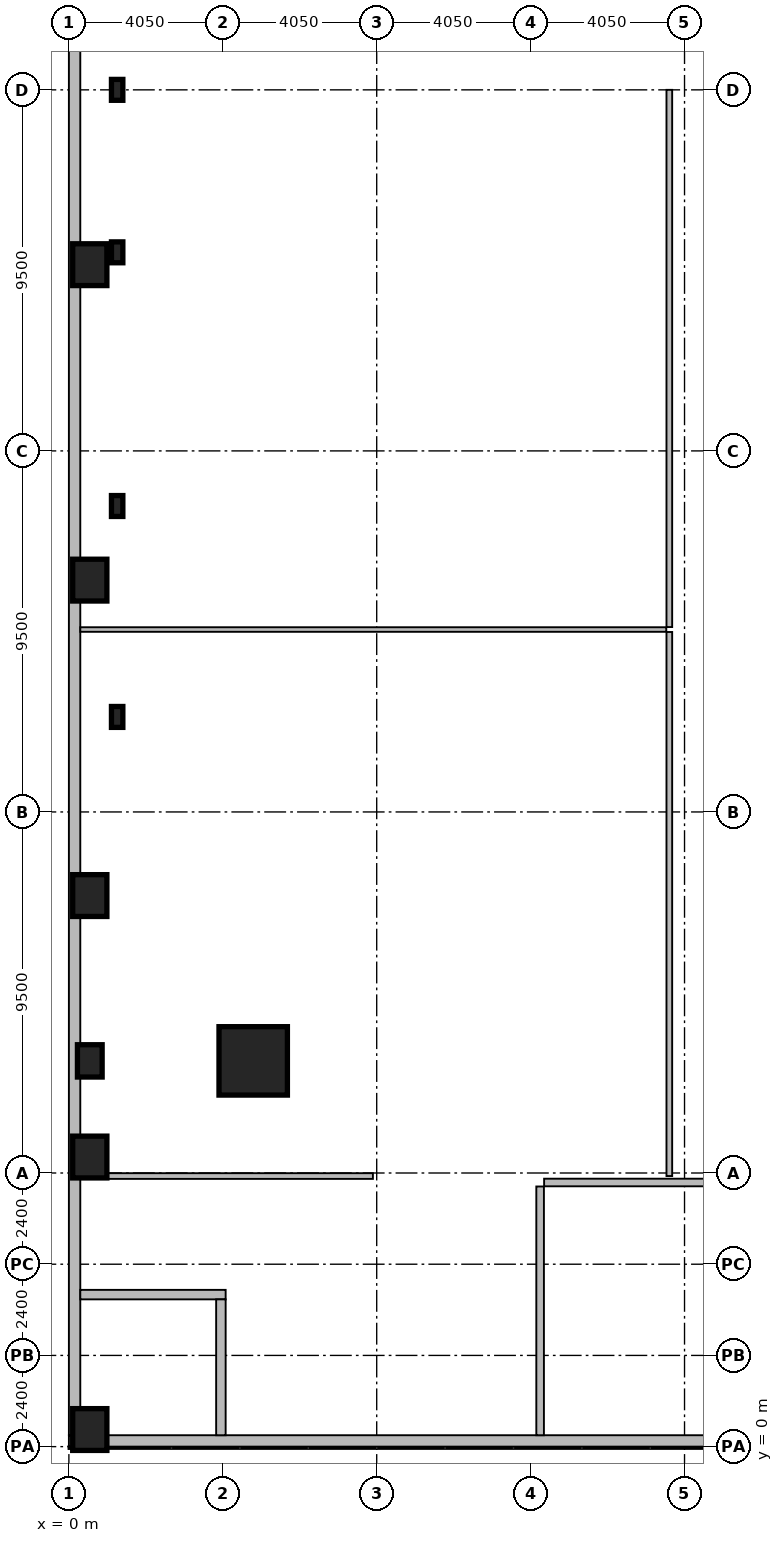
"""IFC4 building model, lengths in metres.
Left out: names, types, materials, properties, quantities, classifications, styles, units other than length and angle.
Written with IfcOpenShell. Run it as: python <this file> out.ifc"""

import sys

from ifc_helpers import new_model, si_unit, direction, frame, frame_2d, origin, origin_2d, place, context, subcontext, project, spatial, rectangle, hollow_rectangle, i_section, extrude, element, fill, save


model = new_model("IFC4")
c1 = context("Model", 3, precision=1e-05, world=origin(), true_north=direction((0.0, 1.0)))
c2 = subcontext(c1, "Body", "Model", "MODEL_VIEW")
j1 = project(units=[si_unit("LENGTHUNIT", "METRE"), si_unit("PLANEANGLEUNIT", "RADIAN")], contexts=[c1])
p1 = place(None, origin())
s1 = spatial("IfcSite", under=j1, at=p1, CompositionType="ELEMENT")
p2 = place(p1, origin())
s2 = spatial("IfcBuilding", under=s1, at=p2, CompositionType="ELEMENT")
p3 = place(p2, origin())
s3 = spatial("IfcBuildingStorey", under=s2, at=p3, CompositionType="ELEMENT", Elevation=0.0)
p4 = place(p3, frame((4.85, 10.15, 0.0), z_axis=(0.0, 0.0, 1.0), x_axis=(1.0, 0.0, 0.0)))
e1 = element("IfcColumn", 1, at=p4, inside=s3, PredefinedType="COLUMN", context=c2, shape_type="SweptSolid", body=[
    extrude(hollow_rectangle(XDim=1.8, YDim=1.8, WallThickness=0.08, at=origin_2d()), origin(), (0.0, 0.0, 1.0), 5.4),
])
for number, where, z_axis, x_axis in (
    (2, (1.27, 19.2, 0.0), (0.0, 0.0, 1.0), (1.0, 0.0, 0.0)),
    (3, (1.27, 24.75, 0.0), (0.0, 0.0, 1.0), (1.0, 0.0, 0.0)),
    (4, (1.27, 31.425, 0.0), (0.0, 0.0, 1.0), (1.0, 0.0, 0.0)),
    (5, (1.27, 35.7, 0.0), (0.0, 0.0, 1.0), (1.0, 0.0, 0.0)),
):
    element("IfcColumn", number, at=place(p3, frame(where, z_axis=z_axis, x_axis=x_axis)), inside=s3, PredefinedType="COLUMN", context=c2, shape_type="SweptSolid", body=[
        extrude(i_section(OverallWidth=0.3, OverallDepth=0.55, WebThickness=0.015, FlangeThickness=0.029, at=origin_2d()), origin(), (0.0, 0.0, 1.0), 5.4),
    ])
p5 = place(p3, frame((0.55, 7.62, 0.0), z_axis=(0.0, 0.0, 1.0), x_axis=(1.0, 0.0, 0.0)))
e6 = element("IfcColumn", 6, at=p5, inside=s3, PredefinedType="PILASTER", context=c2, shape_type="SweptSolid", body=[
    extrude(rectangle(XDim=0.9, YDim=1.1, at=origin_2d()), origin(), (0.0, 0.0, 1.0), 5.4),
])
p6 = place(p3, frame((0.55, 10.15, 0.0), z_axis=(0.0, 0.0, 1.0), x_axis=(1.0, 0.0, 0.0)))
e7 = element("IfcColumn", 7, at=p6, inside=s3, PredefinedType="PILASTER", context=c2, shape_type="SweptSolid", body=[
    extrude(rectangle(XDim=0.65, YDim=0.85, at=origin_2d()), origin(), (0.0, 0.0, 1.0), 5.4),
])
for number, where, z_axis, x_axis in (
    (8, (0.55, 14.5, 0.0), (0.0, 0.0, 1.0), (1.0, 0.0, 0.0)),
    (9, (0.55, 22.8, 0.0), (0.0, 0.0, 1.0), (1.0, 0.0, 0.0)),
    (10, (0.55, 31.1, 0.0), (0.0, 0.0, 1.0), (1.0, 0.0, 0.0)),
    (11, (0.55, 0.45, 0.0), (0.0, 0.0, 1.0), (1.0, 0.0, 0.0)),
):
    element("IfcColumn", number, at=place(p3, frame(where, z_axis=z_axis, x_axis=x_axis)), inside=s3, PredefinedType="PILASTER", context=c2, shape_type="SweptSolid", body=[
        extrude(rectangle(XDim=0.9, YDim=1.1, at=origin_2d()), origin(), (0.0, 0.0, 1.0), 5.4),
    ])
p7 = place(p3, frame((72.9, 0.15, 0.0), z_axis=(0.0, 0.0, 1.0), x_axis=(-1.0, 0.0, 0.0)))
e12 = element("IfcWall", 12, at=p7, inside=s3, PredefinedType="SOLIDWALL", context=c2, shape_type="SweptSolid", body=[
    extrude(rectangle(XDim=72.9, YDim=0.3, at=frame_2d((36.45, 0.0))), origin(), (0.0, 0.0, 1.0), 4.54),
])
p8 = place(p7, frame((6.5, 0.0, 0.0)))
e13 = element("IfcOpeningElement", 13, at=p8, cuts=e12, PredefinedType="OPENING", context=c2, shape_type="SweptSolid", body=[
    extrude(rectangle(XDim=2.0, YDim=2.5, at=frame_2d((1.0, 1.25))), frame((0.0, 0.16, 0.0), z_axis=(0.0, -1.0, 0.0), x_axis=(1.0, 0.0, 0.0)), (0.0, 0.0, 1.0), 0.32),
])
p9 = place(p7, frame((11.5, 0.0, 0.0)))
e14 = element("IfcOpeningElement", 14, at=p9, cuts=e12, PredefinedType="OPENING", context=c2, shape_type="SweptSolid", body=[
    extrude(rectangle(XDim=2.0, YDim=2.5, at=frame_2d((1.0, 1.25))), frame((0.0, 0.16, 0.0), z_axis=(0.0, -1.0, 0.0), x_axis=(1.0, 0.0, 0.0)), (0.0, 0.0, 1.0), 0.32),
])
p10 = place(p7, frame((62.7, 0.0, 0.0)))
e15 = element("IfcOpeningElement", 15, at=p10, cuts=e12, PredefinedType="OPENING", context=c2, shape_type="SweptSolid", body=[
    extrude(rectangle(XDim=2.0, YDim=2.5, at=frame_2d((1.0, 1.25))), frame((0.0, 0.16, 0.0), z_axis=(0.0, -1.0, 0.0), x_axis=(1.0, 0.0, 0.0)), (0.0, 0.0, 1.0), 0.32),
])
p11 = place(p7, frame((67.1, 0.0, 0.0)))
e16 = element("IfcOpeningElement", 16, at=p11, cuts=e12, PredefinedType="OPENING", context=c2, shape_type="SweptSolid", body=[
    extrude(rectangle(XDim=1.05, YDim=2.15, at=frame_2d((0.525, 1.075))), frame((0.0, 0.16, 0.0), z_axis=(0.0, -1.0, 0.0), x_axis=(1.0, 0.0, 0.0)), (0.0, 0.0, 1.0), 0.32),
])
p12 = place(p7, frame((2.9, 0.0, 0.0)))
e17 = element("IfcOpeningElement", 17, at=p12, cuts=e12, PredefinedType="OPENING", context=c2, shape_type="SweptSolid", body=[
    extrude(rectangle(XDim=1.05, YDim=2.15, at=frame_2d((0.525, 1.075))), frame((0.0, 0.16, 0.0), z_axis=(0.0, -1.0, 0.0), x_axis=(1.0, 0.0, 0.0)), (0.0, 0.0, 1.0), 0.32),
])
p13 = place(p7, frame((18.8, 0.0, 0.9)))
e18 = element("IfcOpeningElement", 18, at=p13, cuts=e12, PredefinedType="OPENING", context=c2, shape_type="SweptSolid", body=[
    extrude(rectangle(XDim=1.5, YDim=2.4, at=frame_2d((0.75, 1.2))), frame((0.0, 0.16, 0.0), z_axis=(0.0, -1.0, 0.0), x_axis=(1.0, 0.0, 0.0)), (0.0, 0.0, 1.0), 0.32),
])
p14 = place(p7, frame((27.9, 0.0, 0.9)))
e19 = element("IfcOpeningElement", 19, at=p14, cuts=e12, PredefinedType="OPENING", context=c2, shape_type="SweptSolid", body=[
    extrude(rectangle(XDim=1.8, YDim=3.2, at=frame_2d((0.9, 1.6))), frame((0.0, 0.16, 0.0), z_axis=(0.0, -1.0, 0.0), x_axis=(1.0, 0.0, 0.0)), (0.0, 0.0, 1.0), 0.32),
])
p15 = place(p7, frame((37.1, 0.0, 0.9)))
e20 = element("IfcOpeningElement", 20, at=p15, cuts=e12, PredefinedType="OPENING", context=c2, shape_type="SweptSolid", body=[
    extrude(rectangle(XDim=1.5, YDim=2.4, at=frame_2d((0.75, 1.2))), frame((0.0, 0.16, 0.0), z_axis=(0.0, -1.0, 0.0), x_axis=(1.0, 0.0, 0.0)), (0.0, 0.0, 1.0), 0.32),
])
p16 = place(p7, frame((46.5, 0.0, 0.9)))
e21 = element("IfcOpeningElement", 21, at=p16, cuts=e12, PredefinedType="OPENING", context=c2, shape_type="SweptSolid", body=[
    extrude(rectangle(XDim=1.8, YDim=3.2, at=frame_2d((0.9, 1.6))), frame((0.0, 0.16, 0.0), z_axis=(0.0, -1.0, 0.0), x_axis=(1.0, 0.0, 0.0)), (0.0, 0.0, 1.0), 0.32),
])
p17 = place(p7, frame((54.7, 0.0, 0.9)))
e22 = element("IfcOpeningElement", 22, at=p17, cuts=e12, PredefinedType="OPENING", context=c2, shape_type="SweptSolid", body=[
    extrude(rectangle(XDim=1.5, YDim=2.4, at=frame_2d((0.75, 1.2))), frame((0.0, 0.16, 0.0), z_axis=(0.0, -1.0, 0.0), x_axis=(1.0, 0.0, 0.0)), (0.0, 0.0, 1.0), 0.32),
])
p18 = place(p3, frame((0.15, 49.575, 0.0), z_axis=(0.0, 0.0, 1.0), x_axis=(0.0, -1.0, 0.0)))
e23 = element("IfcWall", 23, at=p18, inside=s3, PredefinedType="SOLIDWALL", context=c2, shape_type="SweptSolid", body=[
    extrude(rectangle(XDim=49.275, YDim=0.3, at=frame_2d((24.637, 0.0))), origin(), (0.0, 0.0, 1.0), 4.54),
])
p19 = place(p18, frame((3.075, 0.0, 0.9)))
e24 = element("IfcOpeningElement", 24, at=p19, cuts=e23, PredefinedType="OPENING", context=c2, shape_type="SweptSolid", body=[
    extrude(rectangle(XDim=1.8, YDim=3.2, at=frame_2d((0.9, 1.6))), frame((0.0, 0.16, 0.0), z_axis=(0.0, -1.0, 0.0), x_axis=(1.0, 0.0, 0.0)), (0.0, 0.0, 1.0), 0.32),
])
p20 = place(p18, frame((12.525, 0.0, 0.9)))
e25 = element("IfcOpeningElement", 25, at=p20, cuts=e23, PredefinedType="OPENING", context=c2, shape_type="SweptSolid", body=[
    extrude(rectangle(XDim=1.5, YDim=2.4, at=frame_2d((0.75, 1.2))), frame((0.0, 0.16, 0.0), z_axis=(0.0, -1.0, 0.0), x_axis=(1.0, 0.0, 0.0)), (0.0, 0.0, 1.0), 0.32),
])
p21 = place(p18, frame((21.725, 0.0, 0.9)))
e26 = element("IfcOpeningElement", 26, at=p21, cuts=e23, PredefinedType="OPENING", context=c2, shape_type="SweptSolid", body=[
    extrude(rectangle(XDim=1.8, YDim=3.2, at=frame_2d((0.9, 1.6))), frame((0.0, 0.16, 0.0), z_axis=(0.0, -1.0, 0.0), x_axis=(1.0, 0.0, 0.0)), (0.0, 0.0, 1.0), 0.32),
])
p22 = place(p18, frame((30.175, 0.0, 0.9)))
e27 = element("IfcOpeningElement", 27, at=p22, cuts=e23, PredefinedType="OPENING", context=c2, shape_type="SweptSolid", body=[
    extrude(rectangle(XDim=1.5, YDim=2.4, at=frame_2d((0.75, 1.2))), frame((0.0, 0.16, 0.0), z_axis=(0.0, -1.0, 0.0), x_axis=(1.0, 0.0, 0.0)), (0.0, 0.0, 1.0), 0.32),
])
p23 = place(p18, frame((36.375, 0.0, 0.9)))
e28 = element("IfcOpeningElement", 28, at=p23, cuts=e23, PredefinedType="OPENING", context=c2, shape_type="SweptSolid", body=[
    extrude(rectangle(XDim=1.8, YDim=3.2, at=frame_2d((0.9, 1.6))), frame((0.0, 0.16, 0.0), z_axis=(0.0, -1.0, 0.0), x_axis=(1.0, 0.0, 0.0)), (0.0, 0.0, 1.0), 0.32),
])
p24 = place(p3, frame((4.125, 4.0, 0.0), z_axis=(0.0, 0.0, 1.0), x_axis=(-1.0, 0.0, 0.0)))
e29 = element("IfcWall", 29, at=p24, inside=s3, PredefinedType="SOLIDWALL", context=c2, shape_type="SweptSolid", body=[
    extrude(rectangle(XDim=3.825, YDim=0.25, at=frame_2d((1.913, 0.0))), origin(), (0.0, 0.0, 1.0), 4.54),
])
p25 = place(p24, frame((1.312, 0.0, 0.9)))
e30 = element("IfcOpeningElement", 30, at=p25, cuts=e29, PredefinedType="OPENING", context=c2, shape_type="SweptSolid", body=[
    extrude(rectangle(XDim=1.2, YDim=2.8, at=frame_2d((0.6, 1.4))), frame((0.0, 0.135, 0.0), z_axis=(0.0, -1.0, 0.0), x_axis=(1.0, 0.0, 0.0)), (0.0, 0.0, 1.0), 0.27),
])
p26 = place(p3, frame((4.0, 0.3, 0.0), z_axis=(0.0, 0.0, 1.0), x_axis=(0.0, 1.0, 0.0)))
e31 = element("IfcWall", 31, at=p26, inside=s3, PredefinedType="SOLIDWALL", context=c2, shape_type="SweptSolid", body=[
    extrude(rectangle(XDim=3.575, YDim=0.25, at=frame_2d((1.788, 0.0))), origin(), (0.0, 0.0, 1.0), 4.54),
])
p27 = place(p3, frame((12.505, 6.95, 0.0), z_axis=(0.0, 0.0, 1.0), x_axis=(1.0, 0.0, 0.0)))
e32 = element("IfcWall", 32, at=p27, inside=s3, PredefinedType="PARTITIONING", context=c2, shape_type="SweptSolid", body=[
    extrude(rectangle(XDim=44.995, YDim=0.2, at=frame_2d((22.498, 0.0))), origin(), (0.0, 0.0, 1.0), 5.2),
])
p28 = place(p3, frame((12.4, 0.3, 0.0), z_axis=(0.0, 0.0, 1.0), x_axis=(0.0, 1.0, 0.0)))
e33 = element("IfcWall", 33, at=p28, inside=s3, PredefinedType="PARTITIONING", context=c2, shape_type="SweptSolid", body=[
    extrude(rectangle(XDim=6.545, YDim=0.2, at=frame_2d((3.272, 0.0))), origin(), (0.0, 0.0, 1.0), 5.2),
])
p29 = place(p3, frame((15.8, 7.12, 0.0), z_axis=(0.0, 0.0, 1.0), x_axis=(0.0, 1.0, 0.0)))
e34 = element("IfcWall", 34, at=p29, inside=s3, PredefinedType="PARTITIONING", context=c2, shape_type="SweptSolid", body=[
    extrude(rectangle(XDim=14.315, YDim=0.15, at=frame_2d((7.157, 0.0))), origin(), (0.0, 0.0, 1.0), 4.29),
])
p30 = place(p29, frame((5.5, 0.0, 0.0)))
e35 = element("IfcOpeningElement", 35, at=p30, cuts=e34, PredefinedType="OPENING", context=c2, shape_type="SweptSolid", body=[
    extrude(rectangle(XDim=1.6, YDim=2.15, at=frame_2d((0.8, 1.075))), frame((0.0, 0.085, 0.0), z_axis=(0.0, -1.0, 0.0), x_axis=(1.0, 0.0, 0.0)), (0.0, 0.0, 1.0), 0.17),
])
p31 = place(p3, frame((15.8, 21.565, 0.0), z_axis=(0.0, 0.0, 1.0), x_axis=(0.0, 1.0, 0.0)))
e36 = element("IfcWall", 36, at=p31, inside=s3, PredefinedType="PARTITIONING", context=c2, shape_type="SweptSolid", body=[
    extrude(rectangle(XDim=14.135, YDim=0.15, at=frame_2d((7.067, 0.0))), origin(), (0.0, 0.0, 1.0), 4.29),
])
p32 = place(p31, frame((5.5, 0.0, 0.0)))
e37 = element("IfcOpeningElement", 37, at=p32, cuts=e36, PredefinedType="OPENING", context=c2, shape_type="SweptSolid", body=[
    extrude(rectangle(XDim=1.6, YDim=2.15, at=frame_2d((0.8, 1.075))), frame((0.0, 0.085, 0.0), z_axis=(0.0, -1.0, 0.0), x_axis=(1.0, 0.0, 0.0)), (0.0, 0.0, 1.0), 0.17),
])
p33 = place(p3, frame((0.3, 7.12, 0.0), z_axis=(0.0, 0.0, 1.0), x_axis=(1.0, 0.0, 0.0)))
e38 = element("IfcWall", 38, at=p33, inside=s3, PredefinedType="PARTITIONING", context=c2, shape_type="SweptSolid", body=[
    extrude(rectangle(XDim=7.7, YDim=0.15, at=frame_2d((3.85, 0.0))), origin(), (0.0, 0.0, 1.0), 4.54),
])
p34 = place(p3, frame((0.3, 21.5, 0.0), z_axis=(0.0, 0.0, 1.0), x_axis=(1.0, 0.0, 0.0)))
e39 = element("IfcWall", 39, at=p34, inside=s3, PredefinedType="PARTITIONING", context=c2, shape_type="SweptSolid", body=[
    extrude(rectangle(XDim=15.42, YDim=0.12, at=frame_2d((7.71, 0.0))), origin(), (0.0, 0.0, 1.0), 4.54),
])
p35 = place(p10, origin())
e40 = element("IfcDoor", 40, at=p35, inside=s3, OperationType="DOUBLE_DOOR_SINGLE_SWING", PredefinedType="DOOR", context=c2, shape_type="SweptSolid", body=[
    extrude(rectangle(XDim=2.0, YDim=2.5, at=frame_2d((1.0, 1.25))), frame((0.0, 0.025, 0.0), z_axis=(0.0, -1.0, 0.0), x_axis=(1.0, 0.0, 0.0)), (0.0, 0.0, 1.0), 0.05),
])
fill(e15, e40)
p36 = place(p11, origin())
e41 = element("IfcDoor", 41, at=p36, inside=s3, OperationType="SINGLE_SWING_LEFT", PredefinedType="DOOR", context=c2, shape_type="SweptSolid", body=[
    extrude(rectangle(XDim=1.05, YDim=2.15, at=frame_2d((0.525, 1.075))), frame((0.0, 0.025, 0.0), z_axis=(0.0, -1.0, 0.0), x_axis=(1.0, 0.0, 0.0)), (0.0, 0.0, 1.0), 0.05),
])
fill(e16, e41)
p37 = place(p20, origin())
e42 = element("IfcWindow", 42, at=p37, inside=s3, PartitioningType="SINGLE_PANEL", PredefinedType="WINDOW", context=c2, shape_type="SweptSolid", body=[
    extrude(rectangle(XDim=1.5, YDim=2.4, at=frame_2d((0.75, 1.2))), frame((0.0, 0.03, 0.0), z_axis=(0.0, -1.0, 0.0), x_axis=(1.0, 0.0, 0.0)), (0.0, 0.0, 1.0), 0.06),
])
fill(e25, e42)
p38 = place(p21, origin())
e43 = element("IfcWindow", 43, at=p38, inside=s3, PartitioningType="SINGLE_PANEL", PredefinedType="WINDOW", context=c2, shape_type="SweptSolid", body=[
    extrude(rectangle(XDim=1.8, YDim=3.2, at=frame_2d((0.9, 1.6))), frame((0.0, 0.03, 0.0), z_axis=(0.0, -1.0, 0.0), x_axis=(1.0, 0.0, 0.0)), (0.0, 0.0, 1.0), 0.06),
])
fill(e26, e43)
p39 = place(p22, origin())
e44 = element("IfcWindow", 44, at=p39, inside=s3, PartitioningType="SINGLE_PANEL", PredefinedType="WINDOW", context=c2, shape_type="SweptSolid", body=[
    extrude(rectangle(XDim=1.5, YDim=2.4, at=frame_2d((0.75, 1.2))), frame((0.0, 0.03, 0.0), z_axis=(0.0, -1.0, 0.0), x_axis=(1.0, 0.0, 0.0)), (0.0, 0.0, 1.0), 0.06),
])
fill(e27, e44)
p40 = place(p23, origin())
e45 = element("IfcWindow", 45, at=p40, inside=s3, PartitioningType="SINGLE_PANEL", PredefinedType="WINDOW", context=c2, shape_type="SweptSolid", body=[
    extrude(rectangle(XDim=1.8, YDim=3.2, at=frame_2d((0.9, 1.6))), frame((0.0, 0.03, 0.0), z_axis=(0.0, -1.0, 0.0), x_axis=(1.0, 0.0, 0.0)), (0.0, 0.0, 1.0), 0.06),
])
fill(e28, e45)
p41 = place(p25, origin())
e46 = element("IfcWindow", 46, at=p41, inside=s3, PartitioningType="SINGLE_PANEL", PredefinedType="WINDOW", context=c2, shape_type="SweptSolid", body=[
    extrude(rectangle(XDim=1.2, YDim=2.8, at=frame_2d((0.6, 1.4))), frame((0.0, 0.03, 0.0), z_axis=(0.0, -1.0, 0.0), x_axis=(1.0, 0.0, 0.0)), (0.0, 0.0, 1.0), 0.06),
])
fill(e30, e46)
p42 = place(p30, origin())
e47 = element("IfcDoor", 47, at=p42, inside=s3, OperationType="DOUBLE_DOOR_SINGLE_SWING", PredefinedType="DOOR", context=c2, shape_type="SweptSolid", body=[
    extrude(rectangle(XDim=1.6, YDim=2.15, at=frame_2d((0.8, 1.075))), frame((0.0, 0.025, 0.0), z_axis=(0.0, -1.0, 0.0), x_axis=(1.0, 0.0, 0.0)), (0.0, 0.0, 1.0), 0.05),
])
fill(e35, e47)
p43 = place(p32, origin())
e48 = element("IfcDoor", 48, at=p43, inside=s3, OperationType="DOUBLE_DOOR_SINGLE_SWING", PredefinedType="DOOR", context=c2, shape_type="SweptSolid", body=[
    extrude(rectangle(XDim=1.6, YDim=2.15, at=frame_2d((0.8, 1.075))), frame((0.0, 0.025, 0.0), z_axis=(0.0, -1.0, 0.0), x_axis=(1.0, 0.0, 0.0)), (0.0, 0.0, 1.0), 0.05),
])
fill(e37, e48)
save(model, sys.argv[1])
